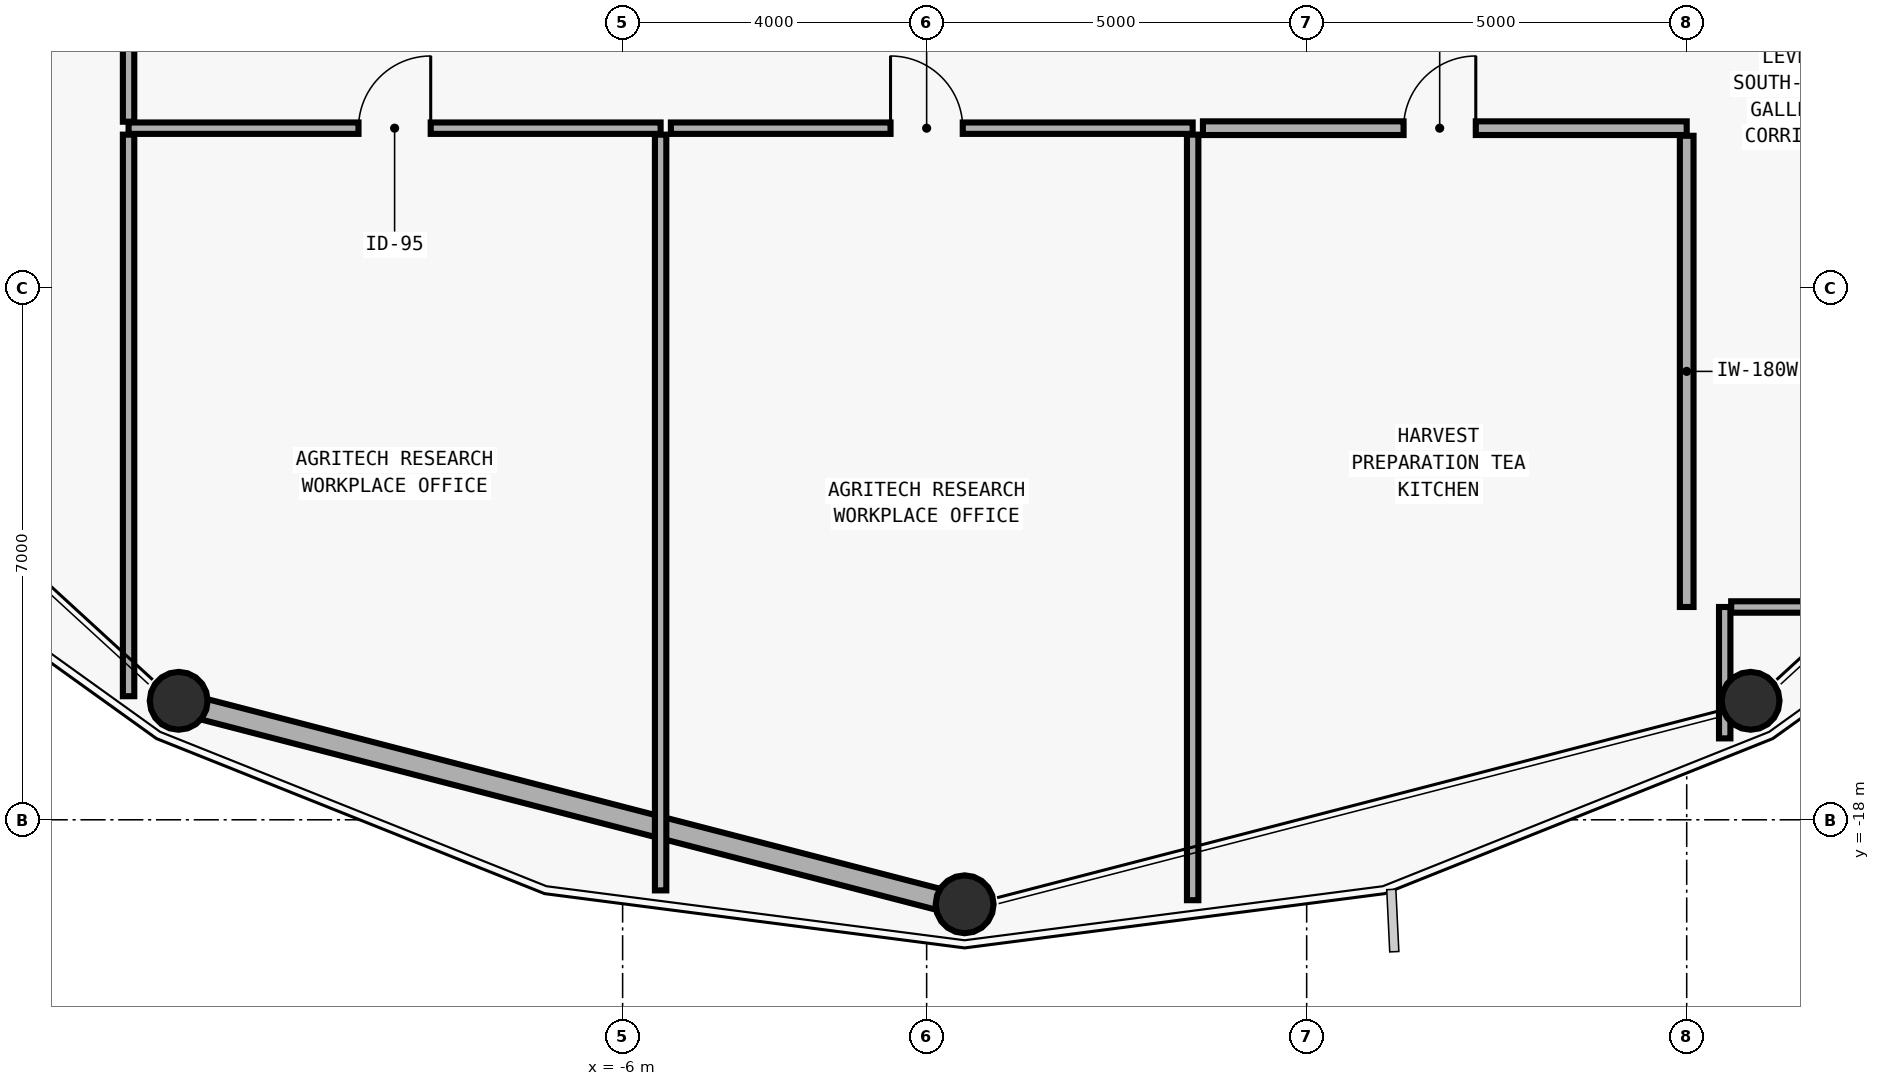
"""IFC4 building model, lengths in metres.
Left out: names, types, materials, properties, quantities, classifications, styles, units other than length and angle.
Written with IfcOpenShell. Run it as: python <this file> out.ifc"""

import sys

from ifc_helpers import new_model, si_unit, direction, frame, frame_2d, origin, origin_2d, place, context, subcontext, project, spatial, rectangle, hollow_circle, extrude, element, fill, save


model = new_model("IFC4")
c1 = context("Model", 3, precision=1e-05, world=origin(), true_north=direction((0.0, 1.0)))
c2 = subcontext(c1, "Body", "Model", "MODEL_VIEW")
j1 = project(units=[si_unit("LENGTHUNIT", "METRE"), si_unit("PLANEANGLEUNIT", "RADIAN")], contexts=[c1])
p1 = place(None, origin())
s1 = spatial("IfcSite", under=j1, at=p1, CompositionType="ELEMENT")
p2 = place(p1, origin())
s2 = spatial("IfcBuilding", under=s1, at=p2, CompositionType="ELEMENT")
p3 = place(p2, frame((0.0, 0.0, 146.1)))
s3 = spatial("IfcBuildingStorey", under=s2, at=p3, CompositionType="ELEMENT", Elevation=146.1)
p4 = place(p3, frame((-11.857, -16.455, 0.0), z_axis=(0.008630735893, 0.010709672276, 0.999905402184), x_axis=(-0.77862958397, 0.627483841199, 0.0)))
e1 = element("IfcColumn", 1, at=p4, inside=s3, PredefinedType="COLUMN", context=c2, shape_type="SweptSolid", body=[
    extrude(hollow_circle(Radius=0.381, WallThickness=0.028, at=origin_2d()), origin(), (0.0, 0.0, 1.0), 3.875),
])
p5 = place(p3, frame((-1.5, -19.136, 0.0), z_axis=(0.0, 0.01241083843, 0.999922982579), x_axis=(-1.0, 0.0, 0.0)))
e2 = element("IfcColumn", 2, at=p5, inside=s3, PredefinedType="COLUMN", context=c2, shape_type="SweptSolid", body=[
    extrude(hollow_circle(Radius=0.381, WallThickness=0.028, at=origin_2d()), origin(), (0.0, 0.0, 1.0), 3.875),
])
p6 = place(p3, frame((8.857, -16.455, 0.0), z_axis=(-0.008630735893, 0.010709672276, 0.999905402184), x_axis=(-0.77862958397, -0.627483841199, 0.0)))
e3 = element("IfcColumn", 3, at=p6, inside=s3, PredefinedType="COLUMN", context=c2, shape_type="SweptSolid", body=[
    extrude(hollow_circle(Radius=0.381, WallThickness=0.028, at=origin_2d()), origin(), (0.0, 0.0, 1.0), 3.875),
])
p7 = place(p3, frame((-1.825, -19.052, 0.0), z_axis=(0.0, 0.0, 1.0), x_axis=(-0.968104156691, 0.250548082806, 0.0)))
e4 = element("IfcWall", 4, at=p7, inside=s3, PredefinedType="SOLIDWALL", context=c2, shape_type="SweptSolid", body=[
    extrude(rectangle(XDim=10.027, YDim=0.28, at=frame_2d((5.013, 0.0))), origin(), (0.0, 0.0, 1.0), 3.16),
])
p8 = place(p3, frame((-12.5, -8.9, 0.0), z_axis=(0.0, 0.0, 1.0), x_axis=(1.0, 0.0, 0.0)))
e5 = element("IfcWall", 5, at=p8, inside=s3, PredefinedType="PARTITIONING", context=c2, shape_type="SweptSolid", body=[
    extrude(rectangle(XDim=7.0, YDim=0.15, at=frame_2d((3.5, 0.0))), origin(), (0.0, 0.0, 1.0), 3.072),
])
p9 = place(p8, frame((3.025, 0.0, 0.0)))
e6 = element("IfcOpeningElement", 6, at=p9, cuts=e5, PredefinedType="OPENING", context=c2, shape_type="SweptSolid", body=[
    extrude(rectangle(XDim=0.95, YDim=2.1, at=frame_2d((0.475, 1.05))), frame((0.0, 0.085, 0.0), z_axis=(0.0, -1.0, 0.0), x_axis=(1.0, 0.0, 0.0)), (0.0, 0.0, 1.0), 0.17),
])
p10 = place(p3, frame((-5.365, -8.9, 0.0), z_axis=(0.0, 0.0, 1.0), x_axis=(1.0, 0.0, 0.0)))
e7 = element("IfcWall", 7, at=p10, inside=s3, PredefinedType="PARTITIONING", context=c2, shape_type="SweptSolid", body=[
    extrude(rectangle(XDim=6.865, YDim=0.15, at=frame_2d((3.433, 0.0))), origin(), (0.0, 0.0, 1.0), 3.64),
])
p11 = place(p10, frame((2.89, 0.0, 0.0)))
e8 = element("IfcOpeningElement", 8, at=p11, cuts=e7, PredefinedType="OPENING", context=c2, shape_type="SweptSolid", body=[
    extrude(rectangle(XDim=0.95, YDim=2.1, at=frame_2d((0.475, 1.05))), frame((0.0, 0.085, 0.0), z_axis=(0.0, -1.0, 0.0), x_axis=(1.0, 0.0, 0.0)), (0.0, 0.0, 1.0), 0.17),
])
p12 = place(p3, frame((1.635, -8.9, 0.0), z_axis=(0.0, 0.0, 1.0), x_axis=(1.0, 0.0, 0.0)))
e9 = element("IfcWall", 9, at=p12, inside=s3, PredefinedType="PLUMBINGWALL", context=c2, shape_type="SweptSolid", body=[
    extrude(rectangle(XDim=6.365, YDim=0.18, at=frame_2d((3.183, 0.0))), origin(), (0.0, 0.0, 1.0), 3.64),
])
p13 = place(p12, frame((2.64, 0.0, 0.0)))
e10 = element("IfcOpeningElement", 10, at=p13, cuts=e9, PredefinedType="OPENING", context=c2, shape_type="SweptSolid", body=[
    extrude(rectangle(XDim=0.95, YDim=2.1, at=frame_2d((0.475, 1.05))), frame((0.0, 0.1, 0.0), z_axis=(0.0, -1.0, 0.0), x_axis=(1.0, 0.0, 0.0)), (0.0, 0.0, 1.0), 0.2),
])
p14 = place(p3, frame((-5.5, -8.985, 0.0), z_axis=(0.0, 0.0, 1.0), x_axis=(0.0, -1.0, 0.0)))
e11 = element("IfcWall", 11, at=p14, inside=s3, PredefinedType="PARTITIONING", context=c2, shape_type="SweptSolid", body=[
    extrude(rectangle(XDim=9.944, YDim=0.15, at=frame_2d((4.972, 0.0))), origin(), (0.0, 0.0, 1.0), 3.64),
])
p15 = place(p3, frame((-12.5, -16.374, 0.0), z_axis=(0.0, 0.0, 1.0), x_axis=(0.0, 1.0, 0.0)))
e12 = element("IfcWall", 12, at=p15, inside=s3, PredefinedType="PARTITIONING", context=c2, shape_type="SweptSolid", body=[
    extrude(rectangle(XDim=7.389, YDim=0.15, at=frame_2d((3.694, 0.0))), origin(), (0.0, 0.0, 1.0), 3.64),
])
p16 = place(p3, frame((1.5, -8.985, 0.0), z_axis=(0.0, 0.0, 1.0), x_axis=(0.0, -1.0, 0.0)))
e13 = element("IfcWall", 13, at=p16, inside=s3, PredefinedType="PARTITIONING", context=c2, shape_type="SweptSolid", body=[
    extrude(rectangle(XDim=10.073, YDim=0.15, at=frame_2d((5.037, 0.0))), origin(), (0.0, 0.0, 1.0), 3.64),
])
p17 = place(p3, frame((8.0, -9.0, 0.0), z_axis=(0.0, 0.0, 1.0), x_axis=(0.0, -1.0, 0.0)))
e14 = element("IfcWall", 14, at=p17, inside=s3, PredefinedType="PLUMBINGWALL", context=c2, shape_type="SweptSolid", body=[
    extrude(rectangle(XDim=6.2, YDim=0.18, at=frame_2d((3.1, 0.0))), origin(), (0.0, 0.0, 1.0), 3.072),
])
p18 = place(p3, frame((8.5, -15.2, 0.0), z_axis=(0.0, 0.0, 1.0), x_axis=(0.0, -1.0, 0.0)))
e15 = element("IfcWall", 15, at=p18, inside=s3, PredefinedType="PARTITIONING", context=c2, shape_type="SweptSolid", body=[
    extrude(rectangle(XDim=1.729, YDim=0.15, at=frame_2d((0.865, 0.0))), origin(), (0.0, 0.0, 1.0), 3.072),
])
p19 = place(p3, frame((8.585, -15.2, 0.0), z_axis=(0.0, 0.0, 1.0), x_axis=(1.0, 0.0, 0.0)))
e16 = element("IfcWall", 16, at=p19, inside=s3, PredefinedType="PARTITIONING", context=c2, shape_type="SweptSolid", body=[
    extrude(rectangle(XDim=2.13, YDim=0.15, at=frame_2d((1.065, 0.0))), origin(), (0.0, 0.0, 1.0), 3.64),
])
p20 = place(p3, frame((-12.5, -6.685, 0.0), z_axis=(0.0, 0.0, 1.0), x_axis=(0.0, -1.0, 0.0)))
e17 = element("IfcWall", 17, at=p20, inside=s3, PredefinedType="PARTITIONING", context=c2, shape_type="SweptSolid", body=[
    extrude(rectangle(XDim=2.13, YDim=0.15, at=frame_2d((1.065, 0.0))), origin(), (0.0, 0.0, 1.0), 3.64),
])
p21 = place(p9, origin())
e18 = element("IfcDoor", 18, at=p21, inside=s3, OperationType="SINGLE_SWING_RIGHT", PredefinedType="DOOR", context=c2, shape_type="SweptSolid", body=[
    extrude(rectangle(XDim=0.95, YDim=2.1, at=frame_2d((0.475, 1.05))), frame((0.0, 0.025, 0.0), z_axis=(0.0, -1.0, 0.0), x_axis=(1.0, 0.0, 0.0)), (0.0, 0.0, 1.0), 0.05),
])
fill(e6, e18)
p22 = place(p11, origin())
e19 = element("IfcDoor", 19, at=p22, inside=s3, OperationType="SINGLE_SWING_LEFT", PredefinedType="DOOR", context=c2, shape_type="SweptSolid", body=[
    extrude(rectangle(XDim=0.95, YDim=2.1, at=frame_2d((0.475, 1.05))), frame((0.0, 0.025, 0.0), z_axis=(0.0, -1.0, 0.0), x_axis=(1.0, 0.0, 0.0)), (0.0, 0.0, 1.0), 0.05),
])
fill(e8, e19)
p23 = place(p13, origin())
e20 = element("IfcDoor", 20, at=p23, inside=s3, OperationType="SINGLE_SWING_RIGHT", PredefinedType="DOOR", context=c2, shape_type="SweptSolid", body=[
    extrude(rectangle(XDim=0.95, YDim=2.1, at=frame_2d((0.475, 1.05))), frame((0.0, 0.025, 0.0), z_axis=(0.0, -1.0, 0.0), x_axis=(1.0, 0.0, 0.0)), (0.0, 0.0, 1.0), 0.05),
])
fill(e10, e20)
save(model, sys.argv[1])
